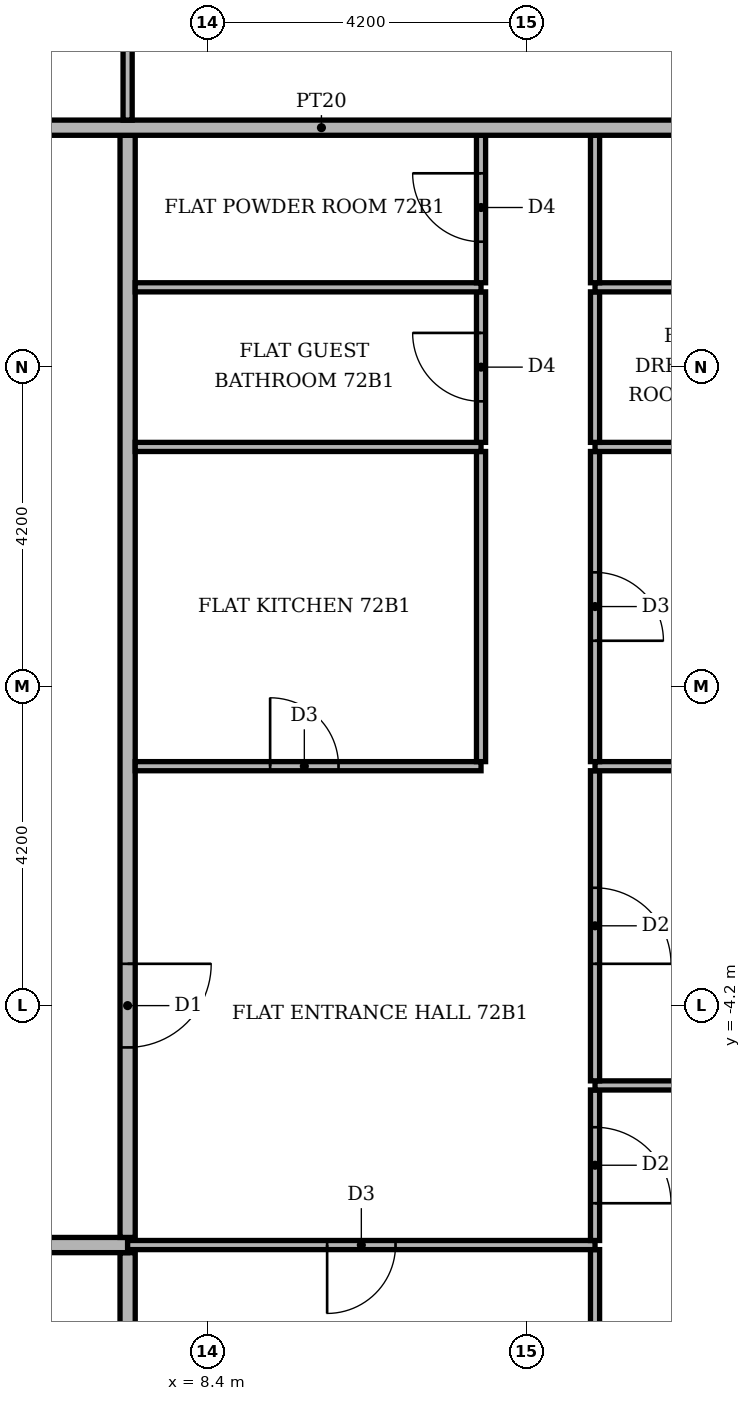
"""IFC4 building model, lengths in metres.
Left out: names, types, materials, properties, quantities, classifications, styles, units other than length and angle.
Written with IfcOpenShell. Run it as: python <this file> out.ifc"""

import sys

from ifc_helpers import new_model, si_unit, direction, frame, frame_2d, origin, place, context, subcontext, project, spatial, rectangle, extrude, element, fill, save


model = new_model("IFC4")
c1 = context("Model", 3, precision=1e-05, world=origin(), true_north=direction((0.0, 1.0)))
c2 = subcontext(c1, "Body", "Model", "MODEL_VIEW")
j1 = project(units=[si_unit("LENGTHUNIT", "METRE"), si_unit("PLANEANGLEUNIT", "RADIAN")], contexts=[c1])
p1 = place(None, origin())
s1 = spatial("IfcSite", under=j1, at=p1, CompositionType="ELEMENT")
p2 = place(p1, origin())
s2 = spatial("IfcBuilding", under=s1, at=p2, CompositionType="ELEMENT")
p3 = place(p2, frame((0.0, 0.0, 300.6)))
s3 = spatial("IfcBuildingStorey", under=s2, at=p3, CompositionType="ELEMENT", Elevation=300.6)
p4 = place(p3, frame((7.35, -18.5, 0.0), z_axis=(0.0, 0.0, 1.0), x_axis=(0.0, 1.0, 0.0)))
e1 = element("IfcWall", 1, at=p4, inside=s3, PredefinedType="PARTITIONING", context=c2, shape_type="SweptSolid", body=[
    extrude(rectangle(XDim=11.05, YDim=0.2, at=frame_2d((5.525, 0.0))), origin(), (0.0, 0.0, 1.0), 3.55),
])
p5 = place(p3, frame((13.5, -13.0, 0.0), z_axis=(0.0, 0.0, 1.0), x_axis=(0.0, 1.0, 0.0)))
e2 = element("IfcWall", 2, at=p5, inside=s3, PredefinedType="PARTITIONING", context=c2, shape_type="SweptSolid", body=[
    extrude(rectangle(XDim=5.59, YDim=0.12, at=frame_2d((2.795, 0.0))), origin(), (0.0, 0.0, 1.0), 3.55),
])
p6 = place(p3, frame((-18.5, -7.35, 0.0), z_axis=(0.0, 0.0, 1.0), x_axis=(1.0, 0.0, 0.0)))
e3 = element("IfcWall", 3, at=p6, inside=s3, PredefinedType="PARTITIONING", context=c2, shape_type="SweptSolid", body=[
    extrude(rectangle(XDim=25.85, YDim=0.2, at=frame_2d((12.925, 0.0))), origin(), (0.0, 0.0, 1.0), 3.55),
])
p7 = place(p6, frame((13.75, 0.0, 0.0)))
e4 = element("IfcOpeningElement", 4, at=p7, cuts=e3, PredefinedType="OPENING", context=c2, shape_type="SweptSolid", body=[
    extrude(rectangle(XDim=1.1, YDim=2.4, at=frame_2d((0.55, 1.2))), frame((0.0, 0.11, 0.0), z_axis=(0.0, -1.0, 0.0), x_axis=(1.0, 0.0, 0.0)), (0.0, 0.0, 1.0), 0.22),
])
p8 = place(p3, frame((7.35, -7.35, 0.0), z_axis=(0.0, 0.0, 1.0), x_axis=(1.0, 0.0, 0.0)))
e5 = element("IfcWall", 5, at=p8, inside=s3, PredefinedType="PARTITIONING", context=c2, shape_type="SweptSolid", body=[
    extrude(rectangle(XDim=6.15, YDim=0.12, at=frame_2d((3.075, 0.0))), origin(), (0.0, 0.0, 1.0), 3.55),
])
p9 = place(p8, frame((2.625, 0.0, 0.0)))
e6 = element("IfcOpeningElement", 6, at=p9, cuts=e5, PredefinedType="OPENING", context=c2, shape_type="SweptSolid", body=[
    extrude(rectangle(XDim=0.9, YDim=2.1, at=frame_2d((0.45, 1.05))), frame((0.0, 0.07, 0.0), z_axis=(0.0, -1.0, 0.0), x_axis=(1.0, 0.0, 0.0)), (0.0, 0.0, 1.0), 0.14),
])
p10 = place(p3, frame((13.5, -7.29, 0.0), z_axis=(0.0, 0.0, 1.0), x_axis=(0.0, 1.0, 0.0)))
e7 = element("IfcWall", 7, at=p10, inside=s3, PredefinedType="PARTITIONING", context=c2, shape_type="SweptSolid", body=[
    extrude(rectangle(XDim=1.98, YDim=0.12, at=frame_2d((0.99, 0.0))), origin(), (0.0, 0.0, 1.0), 3.55),
])
p11 = place(p10, frame((0.49, 0.0, 0.0)))
e8 = element("IfcOpeningElement", 8, at=p11, cuts=e7, PredefinedType="OPENING", context=c2, shape_type="SweptSolid", body=[
    extrude(rectangle(XDim=1.0, YDim=2.1, at=frame_2d((0.5, 1.05))), frame((0.0, 0.07, 0.0), z_axis=(0.0, -1.0, 0.0), x_axis=(1.0, 0.0, 0.0)), (0.0, 0.0, 1.0), 0.14),
])
p12 = place(p3, frame((7.35, -7.25, 0.0), z_axis=(0.0, 0.0, 1.0), x_axis=(0.0, 1.0, 0.0)))
e9 = element("IfcWall", 9, at=p12, inside=s3, PredefinedType="PARTITIONING", context=c2, shape_type="SweptSolid", body=[
    extrude(rectangle(XDim=14.5, YDim=0.2, at=frame_2d((7.25, 0.0))), origin(), (0.0, 0.0, 1.0), 3.55),
])
p13 = place(p12, frame((2.5, 0.0, 0.0)))
e10 = element("IfcOpeningElement", 10, at=p13, cuts=e9, PredefinedType="OPENING", context=c2, shape_type="SweptSolid", body=[
    extrude(rectangle(XDim=1.1, YDim=2.4, at=frame_2d((0.55, 1.2))), frame((0.0, 0.11, 0.0), z_axis=(0.0, -1.0, 0.0), x_axis=(1.0, 0.0, 0.0)), (0.0, 0.0, 1.0), 0.22),
])
p14 = place(p3, frame((13.5, -5.25, 0.0), z_axis=(0.0, 0.0, 1.0), x_axis=(1.0, 0.0, 0.0)))
e11 = element("IfcWall", 11, at=p14, inside=s3, PredefinedType="PARTITIONING", context=c2, shape_type="SweptSolid", body=[
    extrude(rectangle(XDim=5.0, YDim=0.12, at=frame_2d((2.5, 0.0))), origin(), (0.0, 0.0, 1.0), 3.55),
])
p15 = place(p3, frame((13.5, -5.19, 0.0), z_axis=(0.0, 0.0, 1.0), x_axis=(0.0, 1.0, 0.0)))
e12 = element("IfcWall", 12, at=p15, inside=s3, PredefinedType="PARTITIONING", context=c2, shape_type="SweptSolid", body=[
    extrude(rectangle(XDim=4.08, YDim=0.12, at=frame_2d((2.04, 0.0))), origin(), (0.0, 0.0, 1.0), 3.55),
])
p16 = place(p15, frame((1.54, 0.0, 0.0)))
e13 = element("IfcOpeningElement", 13, at=p16, cuts=e12, PredefinedType="OPENING", context=c2, shape_type="SweptSolid", body=[
    extrude(rectangle(XDim=1.0, YDim=2.1, at=frame_2d((0.5, 1.05))), frame((0.0, 0.07, 0.0), z_axis=(0.0, -1.0, 0.0), x_axis=(1.0, 0.0, 0.0)), (0.0, 0.0, 1.0), 0.14),
])
p17 = place(p3, frame((7.45, -1.05, 0.0), z_axis=(0.0, 0.0, 1.0), x_axis=(1.0, 0.0, 0.0)))
e14 = element("IfcWall", 14, at=p17, inside=s3, PredefinedType="PARTITIONING", context=c2, shape_type="SweptSolid", body=[
    extrude(rectangle(XDim=4.55, YDim=0.12, at=frame_2d((2.275, 0.0))), origin(), (0.0, 0.0, 1.0), 3.55),
])
p18 = place(p17, frame((1.775, 0.0, 0.0)))
e15 = element("IfcOpeningElement", 15, at=p18, cuts=e14, PredefinedType="OPENING", context=c2, shape_type="SweptSolid", body=[
    extrude(rectangle(XDim=0.9, YDim=2.1, at=frame_2d((0.45, 1.05))), frame((0.0, 0.07, 0.0), z_axis=(0.0, -1.0, 0.0), x_axis=(1.0, 0.0, 0.0)), (0.0, 0.0, 1.0), 0.14),
])
p19 = place(p3, frame((13.5, -1.05, 0.0), z_axis=(0.0, 0.0, 1.0), x_axis=(1.0, 0.0, 0.0)))
e16 = element("IfcWall", 16, at=p19, inside=s3, PredefinedType="PARTITIONING", context=c2, shape_type="SweptSolid", body=[
    extrude(rectangle(XDim=3.449, YDim=0.12, at=frame_2d((1.725, 0.0))), origin(), (0.0, 0.0, 1.0), 3.55),
])
p20 = place(p3, frame((12.0, -0.99, 0.0), z_axis=(0.0, 0.0, 1.0), x_axis=(0.0, 1.0, 0.0)))
e17 = element("IfcWall", 17, at=p20, inside=s3, PredefinedType="PARTITIONING", context=c2, shape_type="SweptSolid", body=[
    extrude(rectangle(XDim=4.08, YDim=0.12, at=frame_2d((2.04, 0.0))), origin(), (0.0, 0.0, 1.0), 3.55),
])
p21 = place(p3, frame((13.5, -0.99, 0.0), z_axis=(0.0, 0.0, 1.0), x_axis=(0.0, 1.0, 0.0)))
e18 = element("IfcWall", 18, at=p21, inside=s3, PredefinedType="PARTITIONING", context=c2, shape_type="SweptSolid", body=[
    extrude(rectangle(XDim=4.08, YDim=0.12, at=frame_2d((2.04, 0.0))), origin(), (0.0, 0.0, 1.0), 3.55),
])
p22 = place(p21, frame((1.59, 0.0, 0.0)))
e19 = element("IfcOpeningElement", 19, at=p22, cuts=e18, PredefinedType="OPENING", context=c2, shape_type="SweptSolid", body=[
    extrude(rectangle(XDim=0.9, YDim=2.1, at=frame_2d((0.45, 1.05))), frame((0.0, 0.07, 0.0), z_axis=(0.0, -1.0, 0.0), x_axis=(1.0, 0.0, 0.0)), (0.0, 0.0, 1.0), 0.14),
])
p23 = place(p3, frame((7.45, 3.15, 0.0), z_axis=(0.0, 0.0, 1.0), x_axis=(1.0, 0.0, 0.0)))
e20 = element("IfcWall", 20, at=p23, inside=s3, PredefinedType="PARTITIONING", context=c2, shape_type="SweptSolid", body=[
    extrude(rectangle(XDim=4.55, YDim=0.12, at=frame_2d((2.275, 0.0))), origin(), (0.0, 0.0, 1.0), 3.55),
])
p24 = place(p3, frame((13.5, 3.15, 0.0), z_axis=(0.0, 0.0, 1.0), x_axis=(1.0, 0.0, 0.0)))
e21 = element("IfcWall", 21, at=p24, inside=s3, PredefinedType="PARTITIONING", context=c2, shape_type="SweptSolid", body=[
    extrude(rectangle(XDim=5.0, YDim=0.12, at=frame_2d((2.5, 0.0))), origin(), (0.0, 0.0, 1.0), 3.55),
])
p25 = place(p24, frame((2.2, 0.0, 0.0)))
e22 = element("IfcOpeningElement", 22, at=p25, cuts=e21, PredefinedType="OPENING", context=c2, shape_type="SweptSolid", body=[
    extrude(rectangle(XDim=0.9, YDim=2.1, at=frame_2d((0.45, 1.05))), frame((0.0, 0.07, 0.0), z_axis=(0.0, -1.0, 0.0), x_axis=(1.0, 0.0, 0.0)), (0.0, 0.0, 1.0), 0.14),
])
p26 = place(p3, frame((12.0, 3.21, 0.0), z_axis=(0.0, 0.0, 1.0), x_axis=(0.0, 1.0, 0.0)))
e23 = element("IfcWall", 23, at=p26, inside=s3, PredefinedType="PARTITIONING", context=c2, shape_type="SweptSolid", body=[
    extrude(rectangle(XDim=1.98, YDim=0.12, at=frame_2d((0.99, 0.0))), origin(), (0.0, 0.0, 1.0), 3.55),
])
p27 = place(p26, frame((0.54, 0.0, 0.0)))
e24 = element("IfcOpeningElement", 24, at=p27, cuts=e23, PredefinedType="OPENING", context=c2, shape_type="SweptSolid", body=[
    extrude(rectangle(XDim=0.9, YDim=2.1, at=frame_2d((0.45, 1.05))), frame((0.0, 0.07, 0.0), z_axis=(0.0, -1.0, 0.0), x_axis=(1.0, 0.0, 0.0)), (0.0, 0.0, 1.0), 0.14),
])
p28 = place(p3, frame((13.5, 3.21, 0.0), z_axis=(0.0, 0.0, 1.0), x_axis=(0.0, 1.0, 0.0)))
e25 = element("IfcWall", 25, at=p28, inside=s3, PredefinedType="PARTITIONING", context=c2, shape_type="SweptSolid", body=[
    extrude(rectangle(XDim=1.98, YDim=0.12, at=frame_2d((0.99, 0.0))), origin(), (0.0, 0.0, 1.0), 3.55),
])
p29 = place(p3, frame((7.45, 5.25, 0.0), z_axis=(0.0, 0.0, 1.0), x_axis=(1.0, 0.0, 0.0)))
e26 = element("IfcWall", 26, at=p29, inside=s3, PredefinedType="PARTITIONING", context=c2, shape_type="SweptSolid", body=[
    extrude(rectangle(XDim=4.55, YDim=0.12, at=frame_2d((2.275, 0.0))), origin(), (0.0, 0.0, 1.0), 3.55),
])
p30 = place(p3, frame((13.5, 5.25, 0.0), z_axis=(0.0, 0.0, 1.0), x_axis=(1.0, 0.0, 0.0)))
e27 = element("IfcWall", 27, at=p30, inside=s3, PredefinedType="PARTITIONING", context=c2, shape_type="SweptSolid", body=[
    extrude(rectangle(XDim=5.0, YDim=0.12, at=frame_2d((2.5, 0.0))), origin(), (0.0, 0.0, 1.0), 3.55),
])
p31 = place(p30, frame((2.2, 0.0, 0.0)))
e28 = element("IfcOpeningElement", 28, at=p31, cuts=e27, PredefinedType="OPENING", context=c2, shape_type="SweptSolid", body=[
    extrude(rectangle(XDim=0.9, YDim=2.1, at=frame_2d((0.45, 1.05))), frame((0.0, 0.07, 0.0), z_axis=(0.0, -1.0, 0.0), x_axis=(1.0, 0.0, 0.0)), (0.0, 0.0, 1.0), 0.14),
])
p32 = place(p3, frame((12.0, 5.31, 0.0), z_axis=(0.0, 0.0, 1.0), x_axis=(0.0, 1.0, 0.0)))
e29 = element("IfcWall", 29, at=p32, inside=s3, PredefinedType="PARTITIONING", context=c2, shape_type="SweptSolid", body=[
    extrude(rectangle(XDim=1.94, YDim=0.12, at=frame_2d((0.97, 0.0))), origin(), (0.0, 0.0, 1.0), 3.55),
])
p33 = place(p32, frame((0.54, 0.0, 0.0)))
e30 = element("IfcOpeningElement", 30, at=p33, cuts=e29, PredefinedType="OPENING", context=c2, shape_type="SweptSolid", body=[
    extrude(rectangle(XDim=0.9, YDim=2.1, at=frame_2d((0.45, 1.05))), frame((0.0, 0.07, 0.0), z_axis=(0.0, -1.0, 0.0), x_axis=(1.0, 0.0, 0.0)), (0.0, 0.0, 1.0), 0.14),
])
p34 = place(p3, frame((13.5, 5.31, 0.0), z_axis=(0.0, 0.0, 1.0), x_axis=(0.0, 1.0, 0.0)))
e31 = element("IfcWall", 31, at=p34, inside=s3, PredefinedType="PARTITIONING", context=c2, shape_type="SweptSolid", body=[
    extrude(rectangle(XDim=1.94, YDim=0.12, at=frame_2d((0.97, 0.0))), origin(), (0.0, 0.0, 1.0), 3.55),
])
p35 = place(p3, frame((1.3, 7.35, 0.0), z_axis=(0.0, 0.0, 1.0), x_axis=(1.0, 0.0, 0.0)))
e32 = element("IfcWall", 32, at=p35, inside=s3, PredefinedType="PARTITIONING", context=c2, shape_type="SweptSolid", body=[
    extrude(rectangle(XDim=17.2, YDim=0.2, at=frame_2d((8.6, 0.0))), origin(), (0.0, 0.0, 1.0), 3.55),
])
p36 = place(p35, frame((2.475, 0.0, 0.0)))
e33 = element("IfcOpeningElement", 33, at=p36, cuts=e32, PredefinedType="OPENING", context=c2, shape_type="SweptSolid", body=[
    extrude(rectangle(XDim=1.1, YDim=2.4, at=frame_2d((0.55, 1.2))), frame((0.0, 0.11, 0.0), z_axis=(0.0, -1.0, 0.0), x_axis=(1.0, 0.0, 0.0)), (0.0, 0.0, 1.0), 0.22),
])
p37 = place(p3, frame((7.35, 7.45, 0.0), z_axis=(0.0, 0.0, 1.0), x_axis=(0.0, 1.0, 0.0)))
e34 = element("IfcWall", 34, at=p37, inside=s3, PredefinedType="PARTITIONING", context=c2, shape_type="SweptSolid", body=[
    extrude(rectangle(XDim=6.29, YDim=0.12, at=frame_2d((3.145, 0.0))), origin(), (0.0, 0.0, 1.0), 3.55),
])
p38 = place(p37, frame((2.675, 0.0, 0.0)))
e35 = element("IfcOpeningElement", 35, at=p38, cuts=e34, PredefinedType="OPENING", context=c2, shape_type="SweptSolid", body=[
    extrude(rectangle(XDim=0.9, YDim=2.1, at=frame_2d((0.45, 1.05))), frame((0.0, 0.07, 0.0), z_axis=(0.0, -1.0, 0.0), x_axis=(1.0, 0.0, 0.0)), (0.0, 0.0, 1.0), 0.14),
])
p39 = place(p13, frame((1.1, 0.0, 0.0), z_axis=(0.0, 0.0, 1.0), x_axis=(-1.0, 0.0, 0.0)))
e36 = element("IfcDoor", 36, at=p39, inside=s3, OperationType="SINGLE_SWING_RIGHT", PredefinedType="DOOR", context=c2, shape_type="SweptSolid", body=[
    extrude(rectangle(XDim=1.1, YDim=2.4, at=frame_2d((0.55, 1.2))), frame((0.0, 0.025, 0.0), z_axis=(0.0, -1.0, 0.0), x_axis=(1.0, 0.0, 0.0)), (0.0, 0.0, 1.0), 0.05),
])
fill(e10, e36)
p40 = place(p9, frame((0.9, 0.0, 0.0), z_axis=(0.0, 0.0, 1.0), x_axis=(-1.0, 0.0, 0.0)))
e37 = element("IfcDoor", 37, at=p40, inside=s3, OperationType="SINGLE_SWING_LEFT", PredefinedType="DOOR", context=c2, shape_type="SweptSolid", body=[
    extrude(rectangle(XDim=0.9, YDim=2.1, at=frame_2d((0.45, 1.05))), frame((0.0, 0.025, 0.0), z_axis=(0.0, -1.0, 0.0), x_axis=(1.0, 0.0, 0.0)), (0.0, 0.0, 1.0), 0.05),
])
fill(e6, e37)
p41 = place(p18, origin())
e38 = element("IfcDoor", 38, at=p41, inside=s3, OperationType="SINGLE_SWING_LEFT", PredefinedType="DOOR", context=c2, shape_type="SweptSolid", body=[
    extrude(rectangle(XDim=0.9, YDim=2.1, at=frame_2d((0.45, 1.05))), frame((0.0, 0.025, 0.0), z_axis=(0.0, -1.0, 0.0), x_axis=(1.0, 0.0, 0.0)), (0.0, 0.0, 1.0), 0.05),
])
fill(e15, e38)
p42 = place(p27, origin())
e39 = element("IfcDoor", 39, at=p42, inside=s3, OperationType="SINGLE_SWING_RIGHT", PredefinedType="DOOR", context=c2, shape_type="SweptSolid", body=[
    extrude(rectangle(XDim=0.9, YDim=2.1, at=frame_2d((0.45, 1.05))), frame((0.0, 0.025, 0.0), z_axis=(0.0, -1.0, 0.0), x_axis=(1.0, 0.0, 0.0)), (0.0, 0.0, 1.0), 0.05),
])
fill(e24, e39)
p43 = place(p33, origin())
e40 = element("IfcDoor", 40, at=p43, inside=s3, OperationType="SINGLE_SWING_RIGHT", PredefinedType="DOOR", context=c2, shape_type="SweptSolid", body=[
    extrude(rectangle(XDim=0.9, YDim=2.1, at=frame_2d((0.45, 1.05))), frame((0.0, 0.025, 0.0), z_axis=(0.0, -1.0, 0.0), x_axis=(1.0, 0.0, 0.0)), (0.0, 0.0, 1.0), 0.05),
])
fill(e30, e40)
p44 = place(p11, frame((1.0, 0.0, 0.0), z_axis=(0.0, 0.0, 1.0), x_axis=(-1.0, 0.0, 0.0)))
e41 = element("IfcDoor", 41, at=p44, inside=s3, OperationType="SINGLE_SWING_LEFT", PredefinedType="DOOR", context=c2, shape_type="SweptSolid", body=[
    extrude(rectangle(XDim=1.0, YDim=2.1, at=frame_2d((0.5, 1.05))), frame((0.0, 0.025, 0.0), z_axis=(0.0, -1.0, 0.0), x_axis=(1.0, 0.0, 0.0)), (0.0, 0.0, 1.0), 0.05),
])
fill(e8, e41)
p45 = place(p16, frame((1.0, 0.0, 0.0), z_axis=(0.0, 0.0, 1.0), x_axis=(-1.0, 0.0, 0.0)))
e42 = element("IfcDoor", 42, at=p45, inside=s3, OperationType="SINGLE_SWING_LEFT", PredefinedType="DOOR", context=c2, shape_type="SweptSolid", body=[
    extrude(rectangle(XDim=1.0, YDim=2.1, at=frame_2d((0.5, 1.05))), frame((0.0, 0.025, 0.0), z_axis=(0.0, -1.0, 0.0), x_axis=(1.0, 0.0, 0.0)), (0.0, 0.0, 1.0), 0.05),
])
fill(e13, e42)
p46 = place(p22, frame((0.9, 0.0, 0.0), z_axis=(0.0, 0.0, 1.0), x_axis=(-1.0, 0.0, 0.0)))
e43 = element("IfcDoor", 43, at=p46, inside=s3, OperationType="SINGLE_SWING_LEFT", PredefinedType="DOOR", context=c2, shape_type="SweptSolid", body=[
    extrude(rectangle(XDim=0.9, YDim=2.1, at=frame_2d((0.45, 1.05))), frame((0.0, 0.025, 0.0), z_axis=(0.0, -1.0, 0.0), x_axis=(1.0, 0.0, 0.0)), (0.0, 0.0, 1.0), 0.05),
])
fill(e19, e43)
save(model, sys.argv[1])
